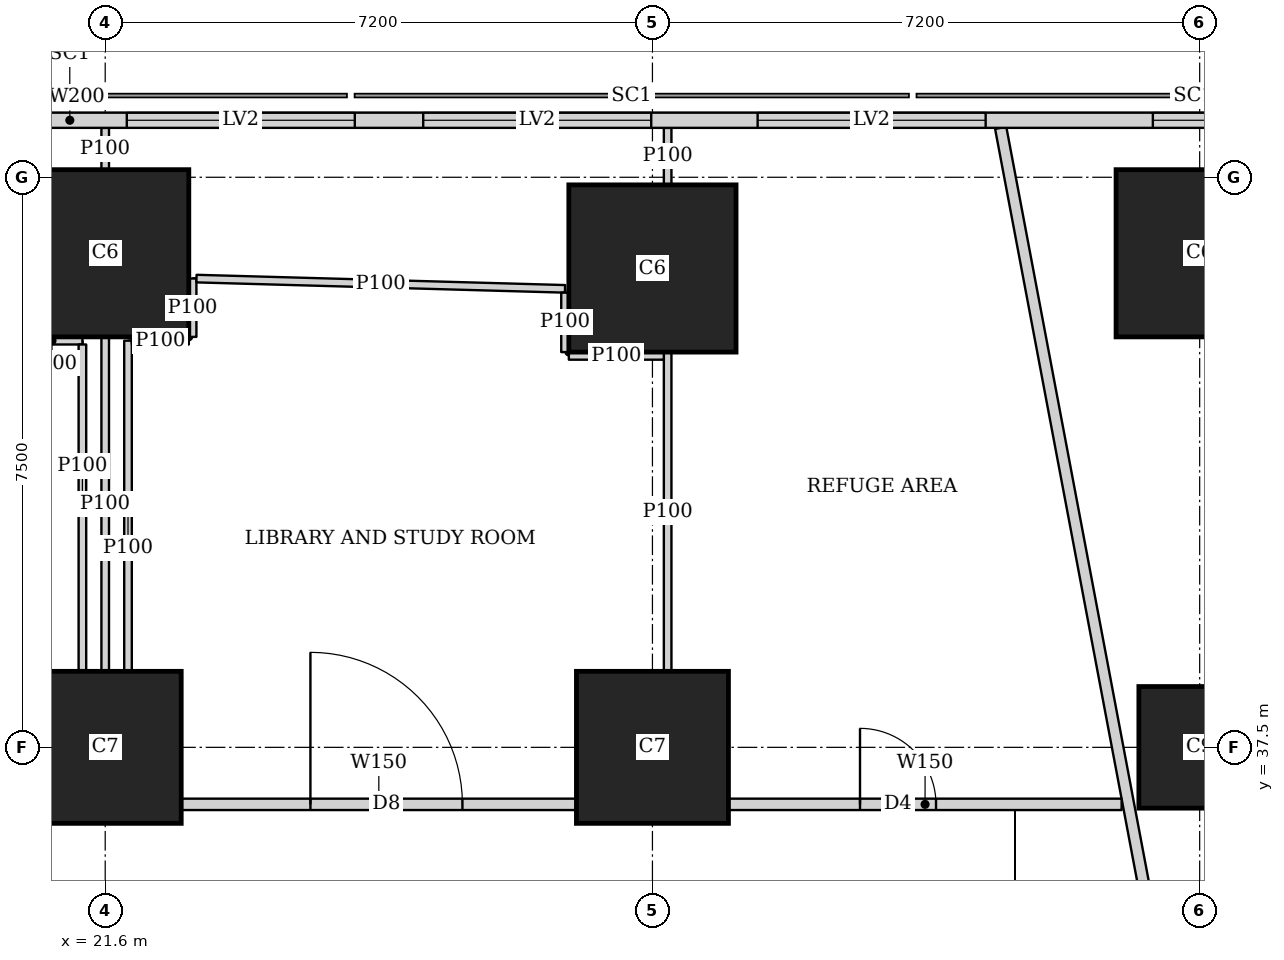
"""IFC4 building model, lengths in metres.
Left out: names, types, materials, properties, quantities, classifications, styles, units other than length and angle.
Written with IfcOpenShell. Run it as: python <this file> out.ifc"""

import sys

from ifc_helpers import new_model, si_unit, direction, frame, frame_2d, origin, origin_2d, place, context, subcontext, project, spatial, rectangle, extrude, element, fill, save


model = new_model("IFC4")
c1 = context("Model", 3, precision=1e-05, world=origin(), true_north=direction((0.0, 1.0)))
c2 = subcontext(c1, "Body", "Model", "MODEL_VIEW")
j1 = project(units=[si_unit("LENGTHUNIT", "METRE"), si_unit("PLANEANGLEUNIT", "RADIAN")], contexts=[c1])
p1 = place(None, origin())
s1 = spatial("IfcSite", under=j1, at=p1, CompositionType="ELEMENT")
p2 = place(p1, origin())
s2 = spatial("IfcBuilding", under=s1, at=p2, CompositionType="ELEMENT")
p3 = place(p2, frame((0.0, 0.0, 130.4)))
s3 = spatial("IfcBuildingStorey", under=s2, at=p3, CompositionType="ELEMENT", Elevation=130.4)
for number, where, z_axis, x_axis in (
    (1, (21.6, 37.5, 0.0), (0.0, 0.0, 1.0), (1.0, 0.0, 0.0)),
    (2, (28.8, 37.5, 0.0), (0.0, 0.0, 1.0), (1.0, 0.0, 0.0)),
):
    element("IfcColumn", number, at=place(p3, frame(where, z_axis=z_axis, x_axis=x_axis)), inside=s3, PredefinedType="COLUMN", context=c2, shape_type="SweptSolid", body=[
        extrude(rectangle(XDim=2.0, YDim=2.0, at=origin_2d()), origin(), (0.0, 0.0, 1.0), 5.4),
    ])
p4 = place(p3, frame((36.0, 37.5, 0.0), z_axis=(0.0, 0.0, 1.0), x_axis=(1.0, 0.0, 0.0)))
e3 = element("IfcColumn", 3, at=p4, inside=s3, PredefinedType="COLUMN", context=c2, shape_type="SweptSolid", body=[
    extrude(rectangle(XDim=1.6, YDim=1.6, at=origin_2d()), origin(), (0.0, 0.0, 1.0), 5.4),
])
for number, where, z_axis, x_axis in (
    (4, (21.6, 44.0, 0.0), (0.0, 0.0, 1.0), (1.0, 0.0, 0.0)),
    (5, (28.8, 43.8, 0.0), (0.0, 0.0, 1.0), (1.0, 0.0, 0.0)),
    (6, (36.0, 44.0, 0.0), (0.0, 0.0, 1.0), (1.0, 0.0, 0.0)),
):
    element("IfcColumn", number, at=place(p3, frame(where, z_axis=z_axis, x_axis=x_axis)), inside=s3, PredefinedType="COLUMN", context=c2, shape_type="SweptSolid", body=[
        extrude(rectangle(XDim=2.2, YDim=2.2, at=origin_2d()), origin(), (0.0, 0.0, 1.0), 5.4),
    ])
p5 = place(p3, frame((40.106, 45.75, 0.0), z_axis=(0.0, 0.0, 1.0), x_axis=(-1.0, 0.0, 0.0)))
e7 = element("IfcWall", 7, at=p5, inside=s3, PredefinedType="SOLIDWALL", context=c2, shape_type="SweptSolid", body=[
    extrude(rectangle(XDim=37.943, YDim=0.2, at=frame_2d((18.971, 0.0))), origin(), (0.0, 0.0, 1.0), 5.15),
])
p6 = place(p5, frame((1.722, 0.0, 0.6)))
e8 = element("IfcOpeningElement", 8, at=p6, cuts=e7, PredefinedType="OPENING", context=c2, shape_type="SweptSolid", body=[
    extrude(rectangle(XDim=3.0, YDim=2.7, at=frame_2d((1.5, 1.35))), frame((0.0, 0.11, 0.0), z_axis=(0.0, -1.0, 0.0), x_axis=(1.0, 0.0, 0.0)), (0.0, 0.0, 1.0), 0.22),
])
p7 = place(p5, frame((6.922, 0.0, 0.6)))
e9 = element("IfcOpeningElement", 9, at=p7, cuts=e7, PredefinedType="OPENING", context=c2, shape_type="SweptSolid", body=[
    extrude(rectangle(XDim=3.0, YDim=2.7, at=frame_2d((1.5, 1.35))), frame((0.0, 0.11, 0.0), z_axis=(0.0, -1.0, 0.0), x_axis=(1.0, 0.0, 0.0)), (0.0, 0.0, 1.0), 0.22),
])
p8 = place(p5, frame((11.322, 0.0, 0.6)))
e10 = element("IfcOpeningElement", 10, at=p8, cuts=e7, PredefinedType="OPENING", context=c2, shape_type="SweptSolid", body=[
    extrude(rectangle(XDim=3.0, YDim=2.7, at=frame_2d((1.5, 1.35))), frame((0.0, 0.11, 0.0), z_axis=(0.0, -1.0, 0.0), x_axis=(1.0, 0.0, 0.0)), (0.0, 0.0, 1.0), 0.22),
])
p9 = place(p5, frame((15.222, 0.0, 0.6)))
e11 = element("IfcOpeningElement", 11, at=p9, cuts=e7, PredefinedType="OPENING", context=c2, shape_type="SweptSolid", body=[
    extrude(rectangle(XDim=3.0, YDim=2.7, at=frame_2d((1.5, 1.35))), frame((0.0, 0.11, 0.0), z_axis=(0.0, -1.0, 0.0), x_axis=(1.0, 0.0, 0.0)), (0.0, 0.0, 1.0), 0.22),
])
p10 = place(p5, frame((19.722, 0.0, 0.6)))
e12 = element("IfcOpeningElement", 12, at=p10, cuts=e7, PredefinedType="OPENING", context=c2, shape_type="SweptSolid", body=[
    extrude(rectangle(XDim=3.0, YDim=2.7, at=frame_2d((1.5, 1.35))), frame((0.0, 0.11, 0.0), z_axis=(0.0, -1.0, 0.0), x_axis=(1.0, 0.0, 0.0)), (0.0, 0.0, 1.0), 0.22),
])
p11 = place(p5, frame((24.222, 0.0, 0.6)))
e13 = element("IfcOpeningElement", 13, at=p11, cuts=e7, PredefinedType="OPENING", context=c2, shape_type="SweptSolid", body=[
    extrude(rectangle(XDim=3.0, YDim=2.7, at=frame_2d((1.5, 1.35))), frame((0.0, 0.11, 0.0), z_axis=(0.0, -1.0, 0.0), x_axis=(1.0, 0.0, 0.0)), (0.0, 0.0, 1.0), 0.22),
])
p12 = place(p5, frame((28.622, 0.0, 0.6)))
e14 = element("IfcOpeningElement", 14, at=p12, cuts=e7, PredefinedType="OPENING", context=c2, shape_type="SweptSolid", body=[
    extrude(rectangle(XDim=3.0, YDim=2.7, at=frame_2d((1.5, 1.35))), frame((0.0, 0.11, 0.0), z_axis=(0.0, -1.0, 0.0), x_axis=(1.0, 0.0, 0.0)), (0.0, 0.0, 1.0), 0.22),
])
p13 = place(p5, frame((33.222, 0.0, 0.6)))
e15 = element("IfcOpeningElement", 15, at=p13, cuts=e7, PredefinedType="OPENING", context=c2, shape_type="SweptSolid", body=[
    extrude(rectangle(XDim=3.0, YDim=2.7, at=frame_2d((1.5, 1.35))), frame((0.0, 0.11, 0.0), z_axis=(0.0, -1.0, 0.0), x_axis=(1.0, 0.0, 0.0)), (0.0, 0.0, 1.0), 0.22),
])
p14 = place(p3, frame((22.601, 36.75, 0.0), z_axis=(0.0, 0.0, 1.0), x_axis=(1.0, 0.0, 0.0)))
e16 = element("IfcWall", 16, at=p14, inside=s3, PredefinedType="SOLIDWALL", context=c2, shape_type="SweptSolid", body=[
    extrude(rectangle(XDim=5.198, YDim=0.15, at=frame_2d((2.599, 0.0))), origin(), (0.0, 0.0, 1.0), 3.15),
])
p15 = place(p14, frame((1.699, 0.0, 0.0)))
e17 = element("IfcOpeningElement", 17, at=p15, cuts=e16, PredefinedType="OPENING", context=c2, shape_type="SweptSolid", body=[
    extrude(rectangle(XDim=2.0, YDim=2.1, at=frame_2d((1.0, 1.05))), frame((0.0, 0.085, 0.0), z_axis=(0.0, -1.0, 0.0), x_axis=(1.0, 0.0, 0.0)), (0.0, 0.0, 1.0), 0.17),
])
p16 = place(p3, frame((29.801, 36.75, 0.0), z_axis=(0.0, 0.0, 1.0), x_axis=(1.0, 0.0, 0.0)))
e18 = element("IfcWall", 18, at=p16, inside=s3, PredefinedType="SOLIDWALL", context=c2, shape_type="SweptSolid", body=[
    extrude(rectangle(XDim=5.172, YDim=0.15, at=frame_2d((2.586, 0.0))), origin(), (0.0, 0.0, 1.0), 3.15),
])
p17 = place(p16, frame((1.73, 0.0, 0.0)))
e19 = element("IfcOpeningElement", 19, at=p17, cuts=e18, PredefinedType="OPENING", context=c2, shape_type="SweptSolid", body=[
    extrude(rectangle(XDim=1.0, YDim=2.1, at=frame_2d((0.5, 1.05))), frame((0.0, 0.085, 0.0), z_axis=(0.0, -1.0, 0.0), x_axis=(1.0, 0.0, 0.0)), (0.0, 0.0, 1.0), 0.17),
])
p18 = place(p3, frame((33.382, 45.65, 0.0), z_axis=(0.0, 0.0, 1.0), x_axis=(0.185593544777, -0.982626600565, 0.0)))
e20 = element("IfcWall", 20, at=p18, inside=s3, PredefinedType="SOLIDWALL", context=c2, shape_type="SweptSolid", body=[
    extrude(rectangle(XDim=47.118, YDim=0.15, at=frame_2d((23.559, 0.0))), origin(), (0.0, 0.0, 1.0), 3.35),
])
p19 = place(p18, frame((24.35, 0.0, 0.0)))
e21 = element("IfcOpeningElement", 21, at=p19, cuts=e20, PredefinedType="OPENING", context=c2, shape_type="SweptSolid", body=[
    extrude(rectangle(XDim=1.0, YDim=2.1, at=frame_2d((0.5, 1.05))), frame((0.0, 0.085, 0.0), z_axis=(0.0, -1.0, 0.0), x_axis=(1.0, 0.0, 0.0)), (0.0, 0.0, 1.0), 0.17),
])
p20 = place(p3, frame((21.6, 38.501, 0.0), z_axis=(0.0, 0.0, 1.0), x_axis=(0.0, 1.0, 0.0)))
e22 = element("IfcWall", 22, at=p20, inside=s3, PredefinedType="PARTITIONING", context=c2, shape_type="SweptSolid", body=[
    extrude(rectangle(XDim=4.398, YDim=0.1, at=frame_2d((2.199, 0.0))), origin(), (0.0, 0.0, 1.0), 3.55),
])
p21 = place(p3, frame((21.6, 45.101, 0.0), z_axis=(0.0, 0.0, 1.0), x_axis=(0.0, 1.0, 0.0)))
e23 = element("IfcWall", 23, at=p21, inside=s3, PredefinedType="PARTITIONING", context=c2, shape_type="SweptSolid", body=[
    extrude(rectangle(XDim=0.549, YDim=0.1, at=frame_2d((0.274, 0.0))), origin(), (0.0, 0.0, 1.0), 5.15),
])
p22 = place(p3, frame((29.0, 38.501, 0.0), z_axis=(0.0, 0.0, 1.0), x_axis=(0.0, 1.0, 0.0)))
e24 = element("IfcWall", 24, at=p22, inside=s3, PredefinedType="PARTITIONING", context=c2, shape_type="SweptSolid", body=[
    extrude(rectangle(XDim=4.198, YDim=0.1, at=frame_2d((2.099, 0.0))), origin(), (0.0, 0.0, 1.0), 3.55),
])
p23 = place(p3, frame((29.0, 44.901, 0.0), z_axis=(0.0, 0.0, 1.0), x_axis=(0.0, 1.0, 0.0)))
e25 = element("IfcWall", 25, at=p23, inside=s3, PredefinedType="PARTITIONING", context=c2, shape_type="SweptSolid", body=[
    extrude(rectangle(XDim=0.749, YDim=0.1, at=frame_2d((0.375, 0.0))), origin(), (0.0, 0.0, 1.0), 5.15),
])
p24 = place(p3, frame((20.5, 42.85, 0.0), z_axis=(0.0, 0.0, 1.0), x_axis=(1.0, 0.0, 0.0)))
e26 = element("IfcWall", 26, at=p24, inside=s3, PredefinedType="PARTITIONING", context=c2, shape_type="SweptSolid", body=[
    extrude(rectangle(XDim=0.8, YDim=0.1, at=frame_2d((0.4, 0.0))), origin(), (0.0, 0.0, 1.0), 3.55),
])
p25 = place(p3, frame((21.3, 42.8, 0.0), z_axis=(0.0, 0.0, 1.0), x_axis=(0.0, -1.0, 0.0)))
e27 = element("IfcWall", 27, at=p25, inside=s3, PredefinedType="PARTITIONING", context=c2, shape_type="SweptSolid", body=[
    extrude(rectangle(XDim=4.299, YDim=0.1, at=frame_2d((2.149, 0.0))), origin(), (0.0, 0.0, 1.0), 3.55),
])
p26 = place(p3, frame((21.9, 38.501, 0.0), z_axis=(0.0, 0.0, 1.0), x_axis=(0.0, 1.0, 0.0)))
e28 = element("IfcWall", 28, at=p26, inside=s3, PredefinedType="PARTITIONING", context=c2, shape_type="SweptSolid", body=[
    extrude(rectangle(XDim=4.349, YDim=0.1, at=frame_2d((2.175, 0.0))), origin(), (0.0, 0.0, 1.0), 3.55),
])
p27 = place(p3, frame((21.95, 42.85, 0.0), z_axis=(0.0, 0.0, 1.0), x_axis=(1.0, 0.0, 0.0)))
e29 = element("IfcWall", 29, at=p27, inside=s3, PredefinedType="PARTITIONING", context=c2, shape_type="SweptSolid", body=[
    extrude(rectangle(XDim=0.75, YDim=0.1, at=frame_2d((0.375, 0.0))), origin(), (0.0, 0.0, 1.0), 3.55),
])
p28 = place(p3, frame((22.75, 42.9, 0.0), z_axis=(0.0, 0.0, 1.0), x_axis=(0.0, 1.0, 0.0)))
e30 = element("IfcWall", 30, at=p28, inside=s3, PredefinedType="PARTITIONING", context=c2, shape_type="SweptSolid", body=[
    extrude(rectangle(XDim=0.768, YDim=0.1, at=frame_2d((0.384, 0.0))), origin(), (0.0, 0.0, 1.0), 3.35),
])
p29 = place(p3, frame((22.801, 43.667, 0.0), z_axis=(0.0, 0.0, 1.0), x_axis=(0.999612594649, -0.027832725686, 0.0)))
e31 = element("IfcWall", 31, at=p29, inside=s3, PredefinedType="PARTITIONING", context=c2, shape_type="SweptSolid", body=[
    extrude(rectangle(XDim=4.851, YDim=0.1, at=frame_2d((2.425, 0.0))), origin(), (0.0, 0.0, 1.0), 3.35),
])
p30 = place(p3, frame((27.65, 43.482, 0.0), z_axis=(0.0, 0.0, 1.0), x_axis=(0.0, -1.0, 0.0)))
e32 = element("IfcWall", 32, at=p30, inside=s3, PredefinedType="PARTITIONING", context=c2, shape_type="SweptSolid", body=[
    extrude(rectangle(XDim=0.782, YDim=0.1, at=frame_2d((0.391, 0.0))), origin(), (0.0, 0.0, 1.0), 3.35),
])
p31 = place(p3, frame((27.7, 42.65, 0.0), z_axis=(0.0, 0.0, 1.0), x_axis=(1.0, 0.0, 0.0)))
e33 = element("IfcWall", 33, at=p31, inside=s3, PredefinedType="PARTITIONING", context=c2, shape_type="SweptSolid", body=[
    extrude(rectangle(XDim=1.25, YDim=0.1, at=frame_2d((0.625, 0.0))), origin(), (0.0, 0.0, 1.0), 3.55),
])
p32 = place(p6, origin())
e34 = element("IfcWindow", 34, at=p32, inside=s3, PartitioningType="SINGLE_PANEL", PredefinedType="USERDEFINED", context=c2, shape_type="SweptSolid", body=[
    extrude(rectangle(XDim=3.0, YDim=2.7, at=frame_2d((1.5, 1.35))), frame((0.0, 0.03, 0.0), z_axis=(0.0, -1.0, 0.0), x_axis=(1.0, 0.0, 0.0)), (0.0, 0.0, 1.0), 0.06),
])
fill(e8, e34)
p33 = place(p7, origin())
e35 = element("IfcWindow", 35, at=p33, inside=s3, PartitioningType="SINGLE_PANEL", PredefinedType="USERDEFINED", context=c2, shape_type="SweptSolid", body=[
    extrude(rectangle(XDim=3.0, YDim=2.7, at=frame_2d((1.5, 1.35))), frame((0.0, 0.03, 0.0), z_axis=(0.0, -1.0, 0.0), x_axis=(1.0, 0.0, 0.0)), (0.0, 0.0, 1.0), 0.06),
])
fill(e9, e35)
p34 = place(p8, origin())
e36 = element("IfcWindow", 36, at=p34, inside=s3, PartitioningType="SINGLE_PANEL", PredefinedType="USERDEFINED", context=c2, shape_type="SweptSolid", body=[
    extrude(rectangle(XDim=3.0, YDim=2.7, at=frame_2d((1.5, 1.35))), frame((0.0, 0.03, 0.0), z_axis=(0.0, -1.0, 0.0), x_axis=(1.0, 0.0, 0.0)), (0.0, 0.0, 1.0), 0.06),
])
fill(e10, e36)
p35 = place(p9, origin())
e37 = element("IfcWindow", 37, at=p35, inside=s3, PartitioningType="SINGLE_PANEL", PredefinedType="USERDEFINED", context=c2, shape_type="SweptSolid", body=[
    extrude(rectangle(XDim=3.0, YDim=2.7, at=frame_2d((1.5, 1.35))), frame((0.0, 0.03, 0.0), z_axis=(0.0, -1.0, 0.0), x_axis=(1.0, 0.0, 0.0)), (0.0, 0.0, 1.0), 0.06),
])
fill(e11, e37)
p36 = place(p15, origin())
e38 = element("IfcDoor", 38, at=p36, inside=s3, OperationType="DOUBLE_DOOR_SINGLE_SWING", PredefinedType="DOOR", context=c2, shape_type="SweptSolid", body=[
    extrude(rectangle(XDim=2.0, YDim=2.1, at=frame_2d((1.0, 1.05))), frame((0.0, 0.025, 0.0), z_axis=(0.0, -1.0, 0.0), x_axis=(1.0, 0.0, 0.0)), (0.0, 0.0, 1.0), 0.05),
])
fill(e17, e38)
p37 = place(p17, origin())
e39 = element("IfcDoor", 39, at=p37, inside=s3, OperationType="SINGLE_SWING_LEFT", PredefinedType="DOOR", context=c2, shape_type="SweptSolid", body=[
    extrude(rectangle(XDim=1.0, YDim=2.1, at=frame_2d((0.5, 1.05))), frame((0.0, 0.025, 0.0), z_axis=(0.0, -1.0, 0.0), x_axis=(1.0, 0.0, 0.0)), (0.0, 0.0, 1.0), 0.05),
])
fill(e19, e39)
save(model, sys.argv[1])
